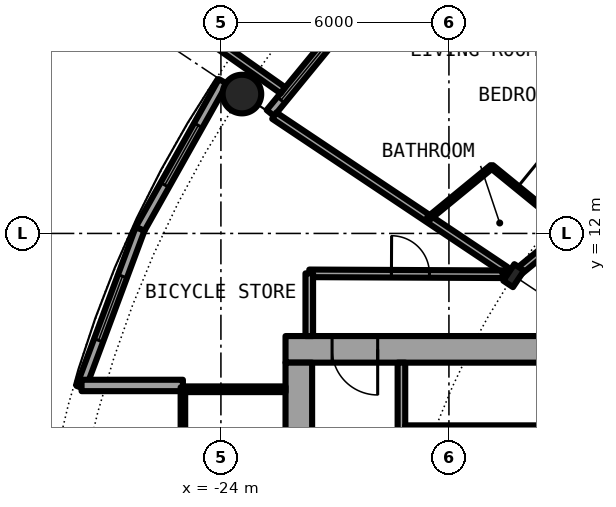
"""IFC4 building model, lengths in metres.
Left out: names, types, materials, properties, quantities, classifications, styles, units other than length and angle.
Written with IfcOpenShell. Run it as: python <this file> out.ifc"""

import sys

from ifc_helpers import new_model, si_unit, direction, frame, frame_2d, origin, origin_2d, place, context, subcontext, project, spatial, rectangle, hollow_circle, i_section, extrude, element, fill, save


model = new_model("IFC4")
c1 = context("Model", 3, precision=1e-05, world=origin(), true_north=direction((0.0, 1.0)))
c2 = subcontext(c1, "Body", "Model", "MODEL_VIEW")
j1 = project(units=[si_unit("LENGTHUNIT", "METRE"), si_unit("PLANEANGLEUNIT", "RADIAN")], contexts=[c1])
p1 = place(None, origin())
s1 = spatial("IfcSite", under=j1, at=p1, CompositionType="ELEMENT")
p2 = place(p1, origin())
s2 = spatial("IfcBuilding", under=s1, at=p2, CompositionType="ELEMENT")
p3 = place(p2, frame((0.0, 0.0, 88.0)))
s3 = spatial("IfcBuildingStorey", under=s2, at=p3, CompositionType="ELEMENT", Elevation=88.0)
p4 = place(p3, frame((-23.448, 15.667, 0.0), z_axis=(0.0, 0.0, 1.0), x_axis=(1.0, 0.0, 0.0)))
e1 = element("IfcColumn", 1, at=p4, inside=s3, PredefinedType="COLUMN", context=c2, shape_type="SweptSolid", body=[
    extrude(hollow_circle(Radius=0.508, WallThickness=0.04, at=origin_2d()), origin(), (0.0, 0.0, 1.0), 3.05),
])
p5 = place(p3, frame((-16.297, 10.889, 0.0), z_axis=(0.0, 0.0, 1.0), x_axis=(-0.831469612303, 0.55557023302, 0.0)))
e2 = element("IfcColumn", 2, at=p5, inside=s3, PredefinedType="COLUMN", context=c2, shape_type="SweptSolid", body=[
    extrude(i_section(OverallWidth=0.306, OverallDepth=0.524, WebThickness=0.021, FlangeThickness=0.04, FilletRadius=0.027, at=origin_2d()), origin(), (0.0, 0.0, 1.0), 3.05),
])
p6 = place(p3, frame((-19.304, 19.304, 0.0), z_axis=(0.0, 0.0, 1.0), x_axis=(-0.634382322723, -0.773019449054, 0.0)))
e3 = element("IfcWall", 3, at=p6, inside=s3, PredefinedType="SOLIDWALL", context=c2, shape_type="SweptSolid", body=[
    extrude(rectangle(XDim=5.352, YDim=0.25, at=frame_2d((2.676, 0.0))), origin(), (0.0, 0.0, 1.0), 2.7),
])
p7 = place(p6, frame((0.841, 0.0, 0.0)))
e4 = element("IfcOpeningElement", 4, at=p7, cuts=e3, PredefinedType="OPENING", context=c2, shape_type="SweptSolid", body=[
    extrude(rectangle(XDim=1.0, YDim=2.2, at=frame_2d((0.5, 1.1))), frame((0.0, 0.135, 0.0), z_axis=(0.0, -1.0, 0.0), x_axis=(1.0, 0.0, 0.0)), (0.0, 0.0, 1.0), 0.27),
])
p8 = place(p6, frame((3.111, 0.0, 0.3)))
e5 = element("IfcOpeningElement", 5, at=p8, cuts=e3, PredefinedType="OPENING", context=c2, shape_type="SweptSolid", body=[
    extrude(rectangle(XDim=1.8, YDim=2.1, at=frame_2d((0.9, 1.05))), frame((0.0, 0.135, 0.0), z_axis=(0.0, -1.0, 0.0), x_axis=(1.0, 0.0, 0.0)), (0.0, 0.0, 1.0), 0.27),
])
p9 = place(p3, frame((-22.37, 15.765, -0.03), z_axis=(0.0, 0.0, 1.0), x_axis=(-0.817256123454, 0.576274612209, 0.0)))
e6 = element("IfcWall", 6, at=p9, inside=s3, PredefinedType="SOLIDWALL", context=c2, shape_type="SweptSolid", body=[
    extrude(rectangle(XDim=2.933, YDim=0.2, at=frame_2d((1.466, 0.0))), origin(), (0.0, 0.0, 1.0), 2.73),
])
p10 = place(p3, frame((-23.946, 16.0, 0.0), z_axis=(0.0, 0.0, 1.0), x_axis=(-0.489696356642, -0.871893042919, 0.0)))
e7 = element("IfcWall", 7, at=p10, inside=s3, PredefinedType="SOLIDWALL", context=c2, shape_type="SweptSolid", body=[
    extrude(rectangle(XDim=4.454, YDim=0.25, at=frame_2d((2.227, 0.0))), origin(), (0.0, 0.0, 1.0), 2.7),
])
p11 = place(p10, frame((1.327, 0.0, 0.3)))
e8 = element("IfcOpeningElement", 8, at=p11, cuts=e7, PredefinedType="OPENING", context=c2, shape_type="SweptSolid", body=[
    extrude(rectangle(XDim=1.8, YDim=2.1, at=frame_2d((0.9, 1.05))), frame((0.0, 0.135, 0.0), z_axis=(0.0, -1.0, 0.0), x_axis=(1.0, 0.0, 0.0)), (0.0, 0.0, 1.0), 0.27),
])
p12 = place(p3, frame((-26.127, 12.117, 0.0), z_axis=(0.0, 0.0, 1.0), x_axis=(-0.349247811493, -0.937030397675, 0.0)))
e9 = element("IfcWall", 9, at=p12, inside=s3, PredefinedType="SOLIDWALL", context=c2, shape_type="SweptSolid", body=[
    extrude(rectangle(XDim=4.452, YDim=0.25, at=frame_2d((2.226, 0.0))), origin(), (0.0, 0.0, 1.0), 2.7),
])
p13 = place(p12, frame((1.327, 0.0, 0.3)))
e10 = element("IfcOpeningElement", 10, at=p13, cuts=e9, PredefinedType="OPENING", context=c2, shape_type="SweptSolid", body=[
    extrude(rectangle(XDim=1.8, YDim=2.1, at=frame_2d((0.9, 1.05))), frame((0.0, 0.135, 0.0), z_axis=(0.0, -1.0, 0.0), x_axis=(1.0, 0.0, 0.0)), (0.0, 0.0, 1.0), 0.27),
])
p14 = place(p3, frame((-25.0, 8.0, 0.0), z_axis=(0.0, 0.0, 1.0), x_axis=(-1.0, 0.0, 0.0)))
e11 = element("IfcWall", 11, at=p14, inside=s3, PredefinedType="SOLIDWALL", context=c2, shape_type="SweptSolid", body=[
    extrude(rectangle(XDim=2.667, YDim=0.3, at=frame_2d((1.333, 0.0))), origin(), (0.0, 0.0, 1.0), 2.7),
])
p15 = place(p3, frame((-8.3, 8.95, 0.0), z_axis=(0.0, 0.0, 1.0), x_axis=(-1.0, 0.0, 0.0)))
e12 = element("IfcWall", 12, at=p15, inside=s3, PredefinedType="SHEAR", context=c2, shape_type="SweptSolid", body=[
    extrude(rectangle(XDim=14.0, YDim=0.7, at=frame_2d((7.0, 0.0))), origin(), (0.0, 0.0, 1.0), 3.05),
])
p16 = place(p15, frame((11.575, 0.0, 0.0)))
e13 = element("IfcOpeningElement", 13, at=p16, cuts=e12, PredefinedType="OPENING", context=c2, shape_type="SweptSolid", body=[
    extrude(rectangle(XDim=1.2, YDim=2.3, at=frame_2d((0.6, 1.15))), frame((0.0, 0.36, 0.0), z_axis=(0.0, -1.0, 0.0), x_axis=(1.0, 0.0, 0.0)), (0.0, 0.0, 1.0), 0.72),
])
p17 = place(p3, frame((-21.95, -8.6, 0.0), z_axis=(0.0, 0.0, 1.0), x_axis=(0.0, 1.0, 0.0)))
e14 = element("IfcWall", 14, at=p17, inside=s3, PredefinedType="SHEAR", context=c2, shape_type="SweptSolid", body=[
    extrude(rectangle(XDim=17.2, YDim=0.7, at=frame_2d((8.6, 0.0))), origin(), (0.0, 0.0, 1.0), 3.05),
])
p18 = place(p17, frame((7.7, 0.0, 0.0)))
e15 = element("IfcOpeningElement", 15, at=p18, cuts=e14, PredefinedType="OPENING", context=c2, shape_type="SweptSolid", body=[
    extrude(rectangle(XDim=1.8, YDim=2.3, at=frame_2d((0.9, 1.15))), frame((0.0, 0.36, 0.0), z_axis=(0.0, -1.0, 0.0), x_axis=(1.0, 0.0, 0.0)), (0.0, 0.0, 1.0), 0.72),
])
p19 = place(p3, frame((-19.25, 8.6, 0.0), z_axis=(0.0, 0.0, 1.0), x_axis=(0.0, -1.0, 0.0)))
e16 = element("IfcWall", 16, at=p19, inside=s3, PredefinedType="SOLIDWALL", context=c2, shape_type="SweptSolid", body=[
    extrude(rectangle(XDim=7.025, YDim=0.2, at=frame_2d((3.513, 0.0))), origin(), (0.0, 0.0, 1.0), 2.7),
])
p20 = place(p19, frame((2.35, 0.0, 0.0)))
e17 = element("IfcOpeningElement", 17, at=p20, cuts=e16, PredefinedType="OPENING", context=c2, shape_type="SweptSolid", body=[
    extrude(rectangle(XDim=1.1, YDim=2.3, at=frame_2d((0.55, 1.15))), frame((0.0, 0.11, 0.0), z_axis=(0.0, -1.0, 0.0), x_axis=(1.0, 0.0, 0.0)), (0.0, 0.0, 1.0), 0.22),
])
p21 = place(p3, frame((-15.45, 6.875, 0.0), z_axis=(0.0, 0.0, 1.0), x_axis=(-1.0, 0.0, 0.0)))
e18 = element("IfcWall", 18, at=p21, inside=s3, PredefinedType="PARTITIONING", context=c2, shape_type="SweptSolid", body=[
    extrude(rectangle(XDim=3.7, YDim=0.15, at=frame_2d((1.85, 0.0))), origin(), (0.0, 0.0, 1.0), 2.7),
])
p22 = place(p21, frame((1.4, 0.0, 0.0)))
e19 = element("IfcOpeningElement", 19, at=p22, cuts=e18, PredefinedType="OPENING", context=c2, shape_type="SweptSolid", body=[
    extrude(rectangle(XDim=0.9, YDim=2.3, at=frame_2d((0.45, 1.15))), frame((0.0, 0.085, 0.0), z_axis=(0.0, -1.0, 0.0), x_axis=(1.0, 0.0, 0.0)), (0.0, 0.0, 1.0), 0.17),
])
p23 = place(p3, frame((-22.3, 7.9, 0.0), z_axis=(0.0, 0.0, 1.0), x_axis=(-1.0, 0.0, 0.0)))
e20 = element("IfcWall", 20, at=p23, inside=s3, PredefinedType="PARTITIONING", context=c2, shape_type="SweptSolid", body=[
    extrude(rectangle(XDim=2.64, YDim=0.15, at=frame_2d((1.32, 0.0))), origin(), (0.0, 0.0, 1.0), 2.7),
])
p24 = place(p3, frame((-25.0, 7.95, 0.0), z_axis=(0.0, 0.0, 1.0), x_axis=(0.0, -1.0, 0.0)))
e21 = element("IfcWall", 21, at=p24, inside=s3, PredefinedType="PARTITIONING", context=c2, shape_type="SweptSolid", body=[
    extrude(rectangle(XDim=15.9, YDim=0.12, at=frame_2d((7.95, 0.0))), origin(), (0.0, 0.0, 1.0), 2.7),
])
p25 = place(p24, frame((0.95, 0.0, 0.1)))
e22 = element("IfcOpeningElement", 22, at=p25, cuts=e21, PredefinedType="OPENING", context=c2, shape_type="SweptSolid", body=[
    extrude(rectangle(XDim=14.0, YDim=2.35, at=frame_2d((7.0, 1.175))), frame((0.0, 0.07, 0.0), z_axis=(0.0, -1.0, 0.0), x_axis=(1.0, 0.0, 0.0)), (0.0, 0.0, 1.0), 0.14),
])
p26 = place(p3, frame((-22.595, 15.098, 0.0), z_axis=(0.0, 0.0, 1.0), x_axis=(0.831382022135, -0.555701298605, 0.0)))
e23 = element("IfcWall", 23, at=p26, inside=s3, PredefinedType="PARTITIONING", context=c2, shape_type="SweptSolid", body=[
    extrude(rectangle(XDim=7.313, YDim=0.2, at=frame_2d((3.657, 0.0))), origin(), (0.0, 0.0, 1.0), 2.7),
])
p27 = place(p3, frame((-17.24, 21.007, 0.0), z_axis=(0.0, 0.0, 1.0), x_axis=(0.634396151441, -0.77300810024, 0.0)))
e24 = element("IfcWall", 24, at=p27, inside=s3, PredefinedType="PARTITIONING", context=c2, shape_type="SweptSolid", body=[
    extrude(rectangle(XDim=8.419, YDim=0.1, at=frame_2d((4.209, 0.0))), origin(), (0.0, 0.0, 1.0), 2.7),
])
p28 = place(p27, frame((6.679, 0.0, 0.0)))
e25 = element("IfcOpeningElement", 25, at=p28, cuts=e24, PredefinedType="OPENING", context=c2, shape_type="SweptSolid", body=[
    extrude(rectangle(XDim=0.9, YDim=2.3, at=frame_2d((0.45, 1.15))), frame((0.0, 0.06, 0.0), z_axis=(0.0, -1.0, 0.0), x_axis=(1.0, 0.0, 0.0)), (0.0, 0.0, 1.0), 0.12),
])
p29 = place(p27, frame((2.468, 0.0, 0.0)))
e26 = element("IfcOpeningElement", 26, at=p29, cuts=e24, PredefinedType="OPENING", context=c2, shape_type="SweptSolid", body=[
    extrude(rectangle(XDim=0.9, YDim=2.3, at=frame_2d((0.45, 1.15))), frame((0.0, 0.06, 0.0), z_axis=(0.0, -1.0, 0.0), x_axis=(1.0, 0.0, 0.0)), (0.0, 0.0, 1.0), 0.12),
])
p30 = place(p3, frame((-16.874, 13.758, 0.0), z_axis=(0.0, 0.0, 1.0), x_axis=(0.774979608522, -0.631986239072, 0.0)))
e27 = element("IfcWall", 27, at=p30, inside=s3, PredefinedType="PARTITIONING", context=c2, shape_type="SweptSolid", body=[
    extrude(rectangle(XDim=2.636, YDim=0.1, at=frame_2d((1.318, 0.0))), origin(), (0.0, 0.0, 1.0), 2.7),
])
p31 = place(p30, frame((0.868, 0.0, 0.0)))
e28 = element("IfcOpeningElement", 28, at=p31, cuts=e27, PredefinedType="OPENING", context=c2, shape_type="SweptSolid", body=[
    extrude(rectangle(XDim=0.9, YDim=2.3, at=frame_2d((0.45, 1.15))), frame((0.0, 0.06, 0.0), z_axis=(0.0, -1.0, 0.0), x_axis=(1.0, 0.0, 0.0)), (0.0, 0.0, 1.0), 0.12),
])
p32 = place(p3, frame((-21.675, 10.95, 0.0), z_axis=(0.0, 0.0, 1.0), x_axis=(0.999988944514, -0.004702217579, 0.0)))
e29 = element("IfcWall", 29, at=p32, inside=s3, PredefinedType="PARTITIONING", context=c2, shape_type="SweptSolid", body=[
    extrude(rectangle(XDim=5.088, YDim=0.2, at=frame_2d((2.544, 0.0))), origin(), (0.0, 0.0, 1.0), 2.7),
])
p33 = place(p32, frame((2.162, 0.0, 0.0)))
e30 = element("IfcOpeningElement", 30, at=p33, cuts=e29, PredefinedType="OPENING", context=c2, shape_type="SweptSolid", body=[
    extrude(rectangle(XDim=1.0, YDim=2.3, at=frame_2d((0.5, 1.15))), frame((0.0, 0.11, 0.0), z_axis=(0.0, -1.0, 0.0), x_axis=(1.0, 0.0, 0.0)), (0.0, 0.0, 1.0), 0.22),
])
p34 = place(p3, frame((-16.173, 10.991, 0.0), z_axis=(0.0, 0.0, 1.0), x_axis=(0.773049018445, 0.634346289562, 0.0)))
e31 = element("IfcWall", 31, at=p34, inside=s3, PredefinedType="PARTITIONING", context=c2, shape_type="SweptSolid", body=[
    extrude(rectangle(XDim=11.219, YDim=0.2, at=frame_2d((5.61, 0.0))), origin(), (0.0, 0.0, 1.0), 2.38),
])
p35 = place(p34, frame((3.135, 0.0, 0.0)))
e32 = element("IfcOpeningElement", 32, at=p35, cuts=e31, PredefinedType="OPENING", context=c2, shape_type="SweptSolid", body=[
    extrude(rectangle(XDim=1.0, YDim=2.3, at=frame_2d((0.5, 1.15))), frame((0.0, 0.11, 0.0), z_axis=(0.0, -1.0, 0.0), x_axis=(1.0, 0.0, 0.0)), (0.0, 0.0, 1.0), 0.22),
])
p36 = place(p3, frame((-18.542, 12.389, 0.0), z_axis=(0.0, 0.0, 1.0), x_axis=(0.772948171844, 0.634469166818, 0.0)))
e33 = element("IfcWall", 33, at=p36, inside=s3, PredefinedType="PARTITIONING", context=c2, shape_type="SweptSolid", body=[
    extrude(rectangle(XDim=2.158, YDim=0.1, at=frame_2d((1.079, 0.0))), origin(), (0.0, 0.0, 1.0), 2.7),
])
p37 = place(p3, frame((-21.675, 9.3, 0.0), z_axis=(0.0, 0.0, 1.0), x_axis=(0.0, 1.0, 0.0)))
e34 = element("IfcWall", 34, at=p37, inside=s3, PredefinedType="PARTITIONING", context=c2, shape_type="SweptSolid", body=[
    extrude(rectangle(XDim=1.65, YDim=0.2, at=frame_2d((0.825, 0.0))), origin(), (0.0, 0.0, 1.0), 2.7),
])
p38 = place(p8, origin())
e35 = element("IfcWindow", 35, at=p38, inside=s3, PartitioningType="SINGLE_PANEL", PredefinedType="WINDOW", context=c2, shape_type="SweptSolid", body=[
    extrude(rectangle(XDim=1.8, YDim=2.1, at=frame_2d((0.9, 1.05))), frame((0.0, 0.03, 0.0), z_axis=(0.0, -1.0, 0.0), x_axis=(1.0, 0.0, 0.0)), (0.0, 0.0, 1.0), 0.06),
])
fill(e5, e35)
p39 = place(p11, origin())
e36 = element("IfcWindow", 36, at=p39, inside=s3, PartitioningType="SINGLE_PANEL", PredefinedType="WINDOW", context=c2, shape_type="SweptSolid", body=[
    extrude(rectangle(XDim=1.8, YDim=2.1, at=frame_2d((0.9, 1.05))), frame((0.0, 0.03, 0.0), z_axis=(0.0, -1.0, 0.0), x_axis=(1.0, 0.0, 0.0)), (0.0, 0.0, 1.0), 0.06),
])
fill(e8, e36)
p40 = place(p13, origin())
e37 = element("IfcWindow", 37, at=p40, inside=s3, PartitioningType="SINGLE_PANEL", PredefinedType="WINDOW", context=c2, shape_type="SweptSolid", body=[
    extrude(rectangle(XDim=1.8, YDim=2.1, at=frame_2d((0.9, 1.05))), frame((0.0, 0.03, 0.0), z_axis=(0.0, -1.0, 0.0), x_axis=(1.0, 0.0, 0.0)), (0.0, 0.0, 1.0), 0.06),
])
fill(e10, e37)
p41 = place(p22, origin())
e38 = element("IfcDoor", 38, at=p41, inside=s3, OperationType="SINGLE_SWING_LEFT", PredefinedType="DOOR", context=c2, shape_type="SweptSolid", body=[
    extrude(rectangle(XDim=0.9, YDim=2.3, at=frame_2d((0.45, 1.15))), frame((0.0, 0.025, 0.0), z_axis=(0.0, -1.0, 0.0), x_axis=(1.0, 0.0, 0.0)), (0.0, 0.0, 1.0), 0.05),
])
fill(e19, e38)
p42 = place(p16, origin())
e39 = element("IfcDoor", 39, at=p42, inside=s3, OperationType="SINGLE_SWING_LEFT", PredefinedType="DOOR", context=c2, shape_type="SweptSolid", body=[
    extrude(rectangle(XDim=1.2, YDim=2.3, at=frame_2d((0.6, 1.15))), frame((0.0, 0.025, 0.0), z_axis=(0.0, -1.0, 0.0), x_axis=(1.0, 0.0, 0.0)), (0.0, 0.0, 1.0), 0.05),
])
fill(e13, e39)
p43 = place(p25, origin())
e40 = element("IfcWindow", 40, at=p43, inside=s3, PartitioningType="SINGLE_PANEL", PredefinedType="WINDOW", context=c2, shape_type="SweptSolid", body=[
    extrude(rectangle(XDim=14.0, YDim=2.35, at=frame_2d((7.0, 1.175))), frame((0.0, 0.03, 0.0), z_axis=(0.0, -1.0, 0.0), x_axis=(1.0, 0.0, 0.0)), (0.0, 0.0, 1.0), 0.06),
])
fill(e22, e40)
p44 = place(p31, origin())
e41 = element("IfcDoor", 41, at=p44, inside=s3, OperationType="SINGLE_SWING_LEFT", PredefinedType="DOOR", context=c2, shape_type="SweptSolid", body=[
    extrude(rectangle(XDim=0.9, YDim=2.3, at=frame_2d((0.45, 1.15))), frame((0.0, 0.025, 0.0), z_axis=(0.0, -1.0, 0.0), x_axis=(1.0, 0.0, 0.0)), (0.0, 0.0, 1.0), 0.05),
])
fill(e28, e41)
p45 = place(p33, origin())
e42 = element("IfcDoor", 42, at=p45, inside=s3, OperationType="SINGLE_SWING_RIGHT", PredefinedType="DOOR", context=c2, shape_type="SweptSolid", body=[
    extrude(rectangle(XDim=1.0, YDim=2.3, at=frame_2d((0.5, 1.15))), frame((0.0, 0.025, 0.0), z_axis=(0.0, -1.0, 0.0), x_axis=(1.0, 0.0, 0.0)), (0.0, 0.0, 1.0), 0.05),
])
fill(e30, e42)
save(model, sys.argv[1])
